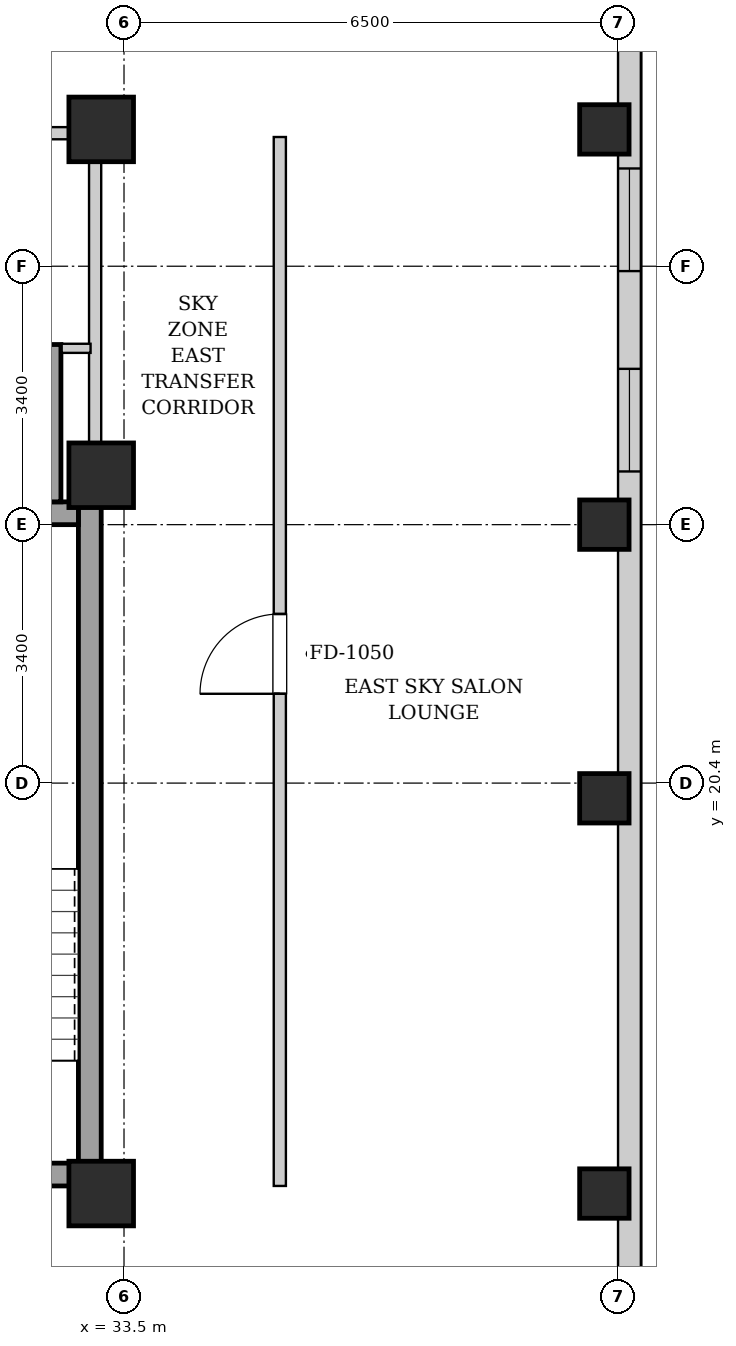
"""IFC4 building model, lengths in metres.
Left out: names, types, materials, properties, quantities, classifications, styles, units other than length and angle.
Written with IfcOpenShell. Run it as: python <this file> out.ifc"""

import sys

from ifc_helpers import new_model, si_unit, direction, frame, frame_2d, origin, origin_2d, place, context, subcontext, project, spatial, rectangle, extrude, element, fill, save


model = new_model("IFC4")
c1 = context("Model", 3, precision=1e-05, world=origin(), true_north=direction((0.0, 1.0)))
c2 = subcontext(c1, "Body", "Model", "MODEL_VIEW")
j1 = project(units=[si_unit("LENGTHUNIT", "METRE"), si_unit("PLANEANGLEUNIT", "RADIAN")], contexts=[c1])
p1 = place(None, origin())
s1 = spatial("IfcSite", under=j1, at=p1, CompositionType="ELEMENT")
p2 = place(p1, origin())
s2 = spatial("IfcBuilding", under=s1, at=p2, CompositionType="ELEMENT")
p3 = place(p2, frame((0.0, 0.0, 174.4)))
s3 = spatial("IfcBuildingStorey", under=s2, at=p3, CompositionType="ELEMENT", Elevation=174.4)
for number, where, z_axis, x_axis in (
    (1, (39.82, 15.0, 0.0), (0.0, 0.0, 1.0), (1.0, 0.0, 0.0)),
    (2, (39.82, 20.2, 0.0), (0.0, 0.0, 1.0), (1.0, 0.0, 0.0)),
    (3, (39.82, 23.8, 0.0), (0.0, 0.0, 1.0), (1.0, 0.0, 0.0)),
    (4, (39.82, 29.0, 0.0), (0.0, 0.0, 1.0), (1.0, 0.0, 0.0)),
):
    element("IfcColumn", number, at=place(p3, frame(where, z_axis=z_axis, x_axis=x_axis)), inside=s3, PredefinedType="COLUMN", context=c2, shape_type="SweptSolid", body=[
        extrude(rectangle(XDim=0.65, YDim=0.65, at=origin_2d()), origin(), (0.0, 0.0, 1.0), 3.3),
    ])
for number, where, z_axis, x_axis in (
    (5, (33.2, 15.0, 0.0), (0.0, 0.0, 1.0), (1.0, 0.0, 0.0)),
    (6, (33.2, 29.0, 0.0), (0.0, 0.0, 1.0), (1.0, 0.0, 0.0)),
    (7, (33.2, 24.45, 0.0), (0.0, 0.0, 1.0), (1.0, 0.0, 0.0)),
):
    element("IfcColumn", number, at=place(p3, frame(where, z_axis=z_axis, x_axis=x_axis)), inside=s3, PredefinedType="COLUMN", context=c2, shape_type="SweptSolid", body=[
        extrude(rectangle(XDim=0.85, YDim=0.85, at=origin_2d()), origin(), (0.0, 0.0, 1.0), 3.3),
    ])
p4 = place(p3, frame((40.15, 37.7, 0.0), z_axis=(0.0, 0.0, 1.0), x_axis=(0.0, -1.0, 0.0)))
e8 = element("IfcWall", 8, at=p4, inside=s3, PredefinedType="SOLIDWALL", context=c2, shape_type="SweptSolid", body=[
    extrude(rectangle(XDim=31.4, YDim=0.3, at=frame_2d((15.7, 0.0))), origin(), (0.0, 0.0, 1.0), 3.04),
])
p5 = place(p4, frame((2.856, 0.0, 0.55)))
e9 = element("IfcOpeningElement", 9, at=p5, cuts=e8, PredefinedType="OPENING", context=c2, shape_type="SweptSolid", body=[
    extrude(rectangle(XDim=1.35, YDim=1.2, at=frame_2d((0.675, 0.6))), frame((0.0, 0.16, 0.0), z_axis=(0.0, -1.0, 0.0), x_axis=(1.0, 0.0, 0.0)), (0.0, 0.0, 1.0), 0.32),
])
p6 = place(p4, frame((1.035, 0.0, 0.55)))
e10 = element("IfcOpeningElement", 10, at=p6, cuts=e8, PredefinedType="OPENING", context=c2, shape_type="SweptSolid", body=[
    extrude(rectangle(XDim=1.35, YDim=1.2, at=frame_2d((0.675, 0.6))), frame((0.0, 0.16, 0.0), z_axis=(0.0, -1.0, 0.0), x_axis=(1.0, 0.0, 0.0)), (0.0, 0.0, 1.0), 0.32),
])
p7 = place(p4, frame((11.85, 0.0, 0.55)))
e11 = element("IfcOpeningElement", 11, at=p7, cuts=e8, PredefinedType="OPENING", context=c2, shape_type="SweptSolid", body=[
    extrude(rectangle(XDim=1.35, YDim=1.2, at=frame_2d((0.675, 0.6))), frame((0.0, 0.16, 0.0), z_axis=(0.0, -1.0, 0.0), x_axis=(1.0, 0.0, 0.0)), (0.0, 0.0, 1.0), 0.32),
])
p8 = place(p4, frame((9.214, 0.0, 0.55)))
e12 = element("IfcOpeningElement", 12, at=p8, cuts=e8, PredefinedType="OPENING", context=c2, shape_type="SweptSolid", body=[
    extrude(rectangle(XDim=1.35, YDim=1.2, at=frame_2d((0.675, 0.6))), frame((0.0, 0.16, 0.0), z_axis=(0.0, -1.0, 0.0), x_axis=(1.0, 0.0, 0.0)), (0.0, 0.0, 1.0), 0.32),
])
p9 = place(p3, frame((33.05, 15.1, 0.0), z_axis=(0.0, 0.0, 1.0), x_axis=(0.0, 1.0, 0.0)))
e13 = element("IfcWall", 13, at=p9, inside=s3, PredefinedType="SHEAR", context=c2, shape_type="SweptSolid", body=[
    extrude(rectangle(XDim=9.0, YDim=0.3, at=frame_2d((4.5, 0.0))), origin(), (0.0, 0.0, 1.0), 3.04),
])
p10 = place(p3, frame((30.05, 23.95, 0.0), z_axis=(0.0, 0.0, 1.0), x_axis=(1.0, 0.0, 0.0)))
e14 = element("IfcWall", 14, at=p10, inside=s3, PredefinedType="SHEAR", context=c2, shape_type="SweptSolid", body=[
    extrude(rectangle(XDim=2.85, YDim=0.3, at=frame_2d((1.425, 0.0))), origin(), (0.0, 0.0, 1.0), 3.04),
])
p11 = place(p3, frame((30.05, 15.25, 0.0), z_axis=(0.0, 0.0, 1.0), x_axis=(1.0, 0.0, 0.0)))
e15 = element("IfcWall", 15, at=p11, inside=s3, PredefinedType="SHEAR", context=c2, shape_type="SweptSolid", body=[
    extrude(rectangle(XDim=2.85, YDim=0.3, at=frame_2d((1.425, 0.0))), origin(), (0.0, 0.0, 1.0), 3.04),
])
p12 = place(p11, frame((0.86, 0.0, 0.0)))
e16 = element("IfcOpeningElement", 16, at=p12, cuts=e15, PredefinedType="OPENING", context=c2, shape_type="SweptSolid", body=[
    extrude(rectangle(XDim=1.1, YDim=2.05, at=frame_2d((0.55, 1.025))), frame((0.0, 0.16, 0.0), z_axis=(0.0, -1.0, 0.0), x_axis=(1.0, 0.0, 0.0)), (0.0, 0.0, 1.0), 0.32),
])
p13 = place(p3, frame((32.56, 24.1, 0.0), z_axis=(0.0, 0.0, 1.0), x_axis=(0.0, 1.0, 0.0)))
e17 = element("IfcWall", 17, at=p13, inside=s3, PredefinedType="SHEAR", context=c2, shape_type="SweptSolid", body=[
    extrude(rectangle(XDim=2.07, YDim=0.22, at=frame_2d((1.035, 0.0))), origin(), (0.0, 0.0, 1.0), 3.04),
])
p14 = place(p3, frame((33.12, 24.12, 0.0), z_axis=(0.0, 0.0, 1.0), x_axis=(0.0, 1.0, 0.0)))
e18 = element("IfcWall", 18, at=p14, inside=s3, PredefinedType="PARTITIONING", context=c2, shape_type="SweptSolid", body=[
    extrude(rectangle(XDim=4.76, YDim=0.16, at=frame_2d((2.38, 0.0))), origin(), (0.0, 0.0, 1.0), 3.04),
])
p15 = place(p3, frame((32.68, 26.12, 0.0), z_axis=(0.0, 0.0, 1.0), x_axis=(1.0, 0.0, 0.0)))
e19 = element("IfcWall", 19, at=p15, inside=s3, PredefinedType="PARTITIONING", context=c2, shape_type="SweptSolid", body=[
    extrude(rectangle(XDim=0.38, YDim=0.12, at=frame_2d((0.19, 0.0))), origin(), (0.0, 0.0, 1.0), 3.04),
])
p16 = place(p3, frame((30.08, 28.95, 0.0), z_axis=(0.0, 0.0, 1.0), x_axis=(1.0, 0.0, 0.0)))
e20 = element("IfcWall", 20, at=p16, inside=s3, PredefinedType="PARTITIONING", context=c2, shape_type="SweptSolid", body=[
    extrude(rectangle(XDim=2.96, YDim=0.16, at=frame_2d((1.48, 0.0))), origin(), (0.0, 0.0, 1.0), 3.04),
])
p17 = place(p16, frame((1.045, 0.0, 0.0)))
e21 = element("IfcOpeningElement", 21, at=p17, cuts=e20, PredefinedType="OPENING", context=c2, shape_type="SweptSolid", body=[
    extrude(rectangle(XDim=0.86, YDim=2.05, at=frame_2d((0.43, 1.025))), frame((0.0, 0.09, 0.0), z_axis=(0.0, -1.0, 0.0), x_axis=(1.0, 0.0, 0.0)), (0.0, 0.0, 1.0), 0.18),
])
p18 = place(p3, frame((35.55, 15.1, 0.0), z_axis=(0.0, 0.0, 1.0), x_axis=(0.0, 1.0, 0.0)))
e22 = element("IfcWall", 22, at=p18, inside=s3, PredefinedType="PARTITIONING", context=c2, shape_type="SweptSolid", body=[
    extrude(rectangle(XDim=13.8, YDim=0.16, at=frame_2d((6.9, 0.0))), origin(), (0.0, 0.0, 1.0), 3.04),
])
p19 = place(p18, frame((6.475, 0.0, 0.0)))
e23 = element("IfcOpeningElement", 23, at=p19, cuts=e22, PredefinedType="OPENING", context=c2, shape_type="SweptSolid", body=[
    extrude(rectangle(XDim=1.05, YDim=2.05, at=frame_2d((0.525, 1.025))), frame((0.0, 0.09, 0.0), z_axis=(0.0, -1.0, 0.0), x_axis=(1.0, 0.0, 0.0)), (0.0, 0.0, 1.0), 0.18),
])
p20 = place(p19, origin())
e24 = element("IfcDoor", 24, at=p20, inside=s3, OperationType="SINGLE_SWING_LEFT", PredefinedType="DOOR", context=c2, shape_type="SweptSolid", body=[
    extrude(rectangle(XDim=1.05, YDim=2.05, at=frame_2d((0.525, 1.025))), frame((0.0, 0.025, 0.0), z_axis=(0.0, -1.0, 0.0), x_axis=(1.0, 0.0, 0.0)), (0.0, 0.0, 1.0), 0.05),
])
fill(e23, e24)
p21 = place(p7, origin())
e25 = element("IfcWindow", 25, at=p21, inside=s3, PartitioningType="SINGLE_PANEL", PredefinedType="WINDOW", context=c2, shape_type="SweptSolid", body=[
    extrude(rectangle(XDim=1.35, YDim=1.2, at=frame_2d((0.675, 0.6))), frame((0.0, 0.03, 0.0), z_axis=(0.0, -1.0, 0.0), x_axis=(1.0, 0.0, 0.0)), (0.0, 0.0, 1.0), 0.06),
])
fill(e11, e25)
p22 = place(p8, origin())
e26 = element("IfcWindow", 26, at=p22, inside=s3, PartitioningType="SINGLE_PANEL", PredefinedType="WINDOW", context=c2, shape_type="SweptSolid", body=[
    extrude(rectangle(XDim=1.35, YDim=1.2, at=frame_2d((0.675, 0.6))), frame((0.0, 0.03, 0.0), z_axis=(0.0, -1.0, 0.0), x_axis=(1.0, 0.0, 0.0)), (0.0, 0.0, 1.0), 0.06),
])
fill(e12, e26)
save(model, sys.argv[1])
